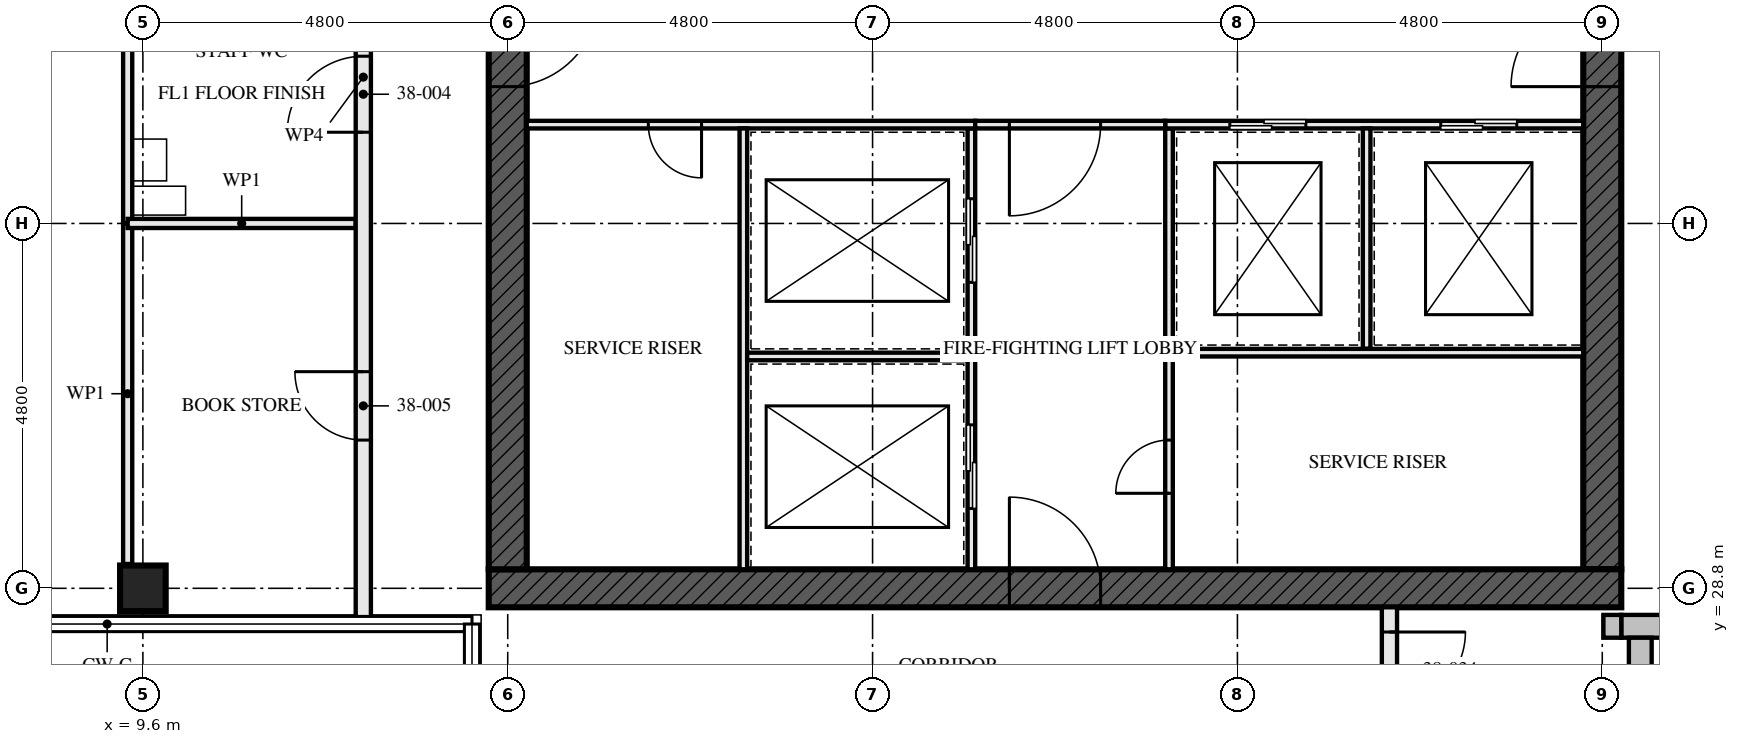
"""IFC4 building model, lengths in metres.
Left out: names, types, materials, properties, quantities, classifications, styles, units other than length and angle.
Written with IfcOpenShell. Run it as: python <this file> out.ifc"""

import sys

from ifc_helpers import new_model, si_unit, direction, frame, frame_2d, origin, origin_2d, place, context, subcontext, project, spatial, rectangle, hollow_rectangle, extrude, element, fill, save


model = new_model("IFC4")
c1 = context("Model", 3, precision=1e-05, world=origin(), true_north=direction((0.0, 1.0)))
c2 = subcontext(c1, "Body", "Model", "MODEL_VIEW")
j1 = project(units=[si_unit("LENGTHUNIT", "METRE"), si_unit("PLANEANGLEUNIT", "RADIAN")], contexts=[c1])
p1 = place(None, origin())
s1 = spatial("IfcSite", under=j1, at=p1, CompositionType="ELEMENT")
p2 = place(p1, origin())
s2 = spatial("IfcBuilding", under=s1, at=p2, CompositionType="ELEMENT")
p3 = place(p2, frame((0.0, 0.0, 141.0)))
s3 = spatial("IfcBuildingStorey", under=s2, at=p3, CompositionType="ELEMENT", Elevation=141.0)
p4 = place(p3, frame((9.6, 28.8, 0.0), z_axis=(0.0, 0.0, 1.0), x_axis=(0.0, 1.0, 0.0)))
e1 = element("IfcColumn", 1, at=p4, inside=s3, PredefinedType="COLUMN", context=c2, shape_type="SweptSolid", body=[
    extrude(hollow_rectangle(XDim=0.6, YDim=0.6, WallThickness=0.08, at=origin_2d()), origin(), (0.0, 0.0, 1.0), 3.5),
])
p5 = place(p3, frame((14.15, 28.8, -0.17), z_axis=(0.0, 0.0, 1.0), x_axis=(1.0, 0.0, 0.0)))
e2 = element("IfcWall", 2, at=p5, inside=s3, PredefinedType="SHEAR", context=c2, shape_type="SweptSolid", body=[
    extrude(rectangle(XDim=14.9, YDim=0.5, at=frame_2d((7.45, 0.0))), origin(), (0.0, 0.0, 1.0), 3.5),
])
p6 = place(p5, frame((6.85, 0.0, 0.17)))
e3 = element("IfcOpeningElement", 3, at=p6, cuts=e2, PredefinedType="OPENING", context=c2, shape_type="SweptSolid", body=[
    extrude(rectangle(XDim=1.2, YDim=2.1, at=frame_2d((0.6, 1.05))), frame((0.0, 0.26, 0.0), z_axis=(0.0, -1.0, 0.0), x_axis=(1.0, 0.0, 0.0)), (0.0, 0.0, 1.0), 0.521),
])
p7 = place(p3, frame((14.4, 42.95, -0.17), z_axis=(0.0, 0.0, 1.0), x_axis=(0.0, -1.0, 0.0)))
e4 = element("IfcWall", 4, at=p7, inside=s3, PredefinedType="SHEAR", context=c2, shape_type="SweptSolid", body=[
    extrude(rectangle(XDim=13.9, YDim=0.5, at=frame_2d((6.95, 0.0))), origin(), (0.0, 0.0, 1.0), 3.5),
])
p8 = place(p7, frame((6.35, 0.0, 0.17)))
e5 = element("IfcOpeningElement", 5, at=p8, cuts=e4, PredefinedType="OPENING", context=c2, shape_type="SweptSolid", body=[
    extrude(rectangle(XDim=1.2, YDim=2.1, at=frame_2d((0.6, 1.05))), frame((0.0, 0.26, 0.0), z_axis=(0.0, -1.0, 0.0), x_axis=(1.0, 0.0, 0.0)), (0.0, 0.0, 1.0), 0.521),
])
p9 = place(p3, frame((28.8, 29.05, -0.17), z_axis=(0.0, 0.0, 1.0), x_axis=(0.0, 1.0, 0.0)))
e6 = element("IfcWall", 6, at=p9, inside=s3, PredefinedType="SHEAR", context=c2, shape_type="SweptSolid", body=[
    extrude(rectangle(XDim=13.9, YDim=0.5, at=frame_2d((6.95, 0.0))), origin(), (0.0, 0.0, 1.0), 3.5),
])
p10 = place(p9, frame((6.35, 0.0, 0.17)))
e7 = element("IfcOpeningElement", 7, at=p10, cuts=e6, PredefinedType="OPENING", context=c2, shape_type="SweptSolid", body=[
    extrude(rectangle(XDim=1.2, YDim=2.1, at=frame_2d((0.6, 1.05))), frame((0.0, 0.26, 0.0), z_axis=(0.0, -1.0, 0.0), x_axis=(1.0, 0.0, 0.0)), (0.0, 0.0, 1.0), 0.521),
])
p11 = place(p3, frame((29.05, 28.3, 0.0), z_axis=(0.0, 0.0, 1.0), x_axis=(1.0, 0.0, 0.0)))
e8 = element("IfcWall", 8, at=p11, inside=s3, PredefinedType="SOLIDWALL", context=c2, shape_type="SweptSolid", body=[
    extrude(rectangle(XDim=10.0, YDim=0.3, at=frame_2d((5.0, 0.0))), origin(), (0.0, 0.0, 1.0), 3.5),
])
p12 = place(p11, frame((0.95, 0.0, 0.6)))
e9 = element("IfcOpeningElement", 9, at=p12, cuts=e8, PredefinedType="OPENING", context=c2, shape_type="SweptSolid", body=[
    extrude(rectangle(XDim=2.4, YDim=1.8, at=frame_2d((1.2, 0.9))), frame((0.0, 0.161, 0.0), z_axis=(0.0, -1.0, 0.0), x_axis=(1.0, 0.0, 0.0)), (0.0, 0.0, 1.0), 0.321),
])
p13 = place(p11, frame((5.75, 0.0, 0.6)))
e10 = element("IfcOpeningElement", 10, at=p13, cuts=e8, PredefinedType="OPENING", context=c2, shape_type="SweptSolid", body=[
    extrude(rectangle(XDim=2.4, YDim=1.8, at=frame_2d((1.2, 0.9))), frame((0.0, 0.161, 0.0), z_axis=(0.0, -1.0, 0.0), x_axis=(1.0, 0.0, 0.0)), (0.0, 0.0, 1.0), 0.321),
])
p14 = place(p3, frame((29.3, 18.85, 0.0), z_axis=(0.0, 0.0, 1.0), x_axis=(0.0, 1.0, 0.0)))
e11 = element("IfcWall", 11, at=p14, inside=s3, PredefinedType="SOLIDWALL", context=c2, shape_type="SweptSolid", body=[
    extrude(rectangle(XDim=9.3, YDim=0.3, at=frame_2d((4.65, 0.0))), origin(), (0.0, 0.0, 1.0), 3.5),
])
p15 = place(p14, frame((2.25, 0.0, 0.0)))
e12 = element("IfcOpeningElement", 12, at=p15, cuts=e11, PredefinedType="OPENING", context=c2, shape_type="SweptSolid", body=[
    extrude(rectangle(XDim=1.0, YDim=2.4, at=frame_2d((0.5, 1.2))), frame((0.0, 0.161, 0.0), z_axis=(0.0, -1.0, 0.0), x_axis=(1.0, 0.0, 0.0)), (0.0, 0.0, 1.0), 0.321),
])
p16 = place(p14, frame((6.35, 0.0, 0.6)))
e13 = element("IfcOpeningElement", 13, at=p16, cuts=e11, PredefinedType="OPENING", context=c2, shape_type="SweptSolid", body=[
    extrude(rectangle(XDim=2.4, YDim=1.8, at=frame_2d((1.2, 0.9))), frame((0.0, 0.161, 0.0), z_axis=(0.0, -1.0, 0.0), x_axis=(1.0, 0.0, 0.0)), (0.0, 0.0, 1.0), 0.321),
])
p17 = place(p3, frame((28.815, 28.3, 2.39), z_axis=(0.0, 0.0, 1.0), x_axis=(1.0, 0.0, 0.0)))
e14 = element("IfcWall", 14, at=p17, inside=s3, PredefinedType="SOLIDWALL", context=c2, shape_type="SweptSolid", body=[
    extrude(rectangle(XDim=0.235, YDim=0.3, at=frame_2d((0.118, 0.0))), origin(), (0.0, 0.0, 1.0), 0.88),
])
p18 = place(p3, frame((9.4, 37.0, 0.0), z_axis=(0.0, 0.0, 1.0), x_axis=(0.0, -1.0, 0.0)))
e15 = element("IfcWall", 15, at=p18, inside=s3, PredefinedType="PARTITIONING", context=c2, shape_type="SweptSolid", body=[
    extrude(rectangle(XDim=3.4, YDim=0.12, at=frame_2d((1.7, 0.0))), origin(), (0.0, 0.0, 1.0), 3.33),
])
p19 = place(p3, frame((9.4, 33.6, 0.0), z_axis=(0.0, 0.0, 1.0), x_axis=(1.0, 0.0, 0.0)))
e16 = element("IfcWall", 16, at=p19, inside=s3, PredefinedType="PARTITIONING", context=c2, shape_type="SweptSolid", body=[
    extrude(rectangle(XDim=3.0, YDim=0.12, at=frame_2d((1.5, 0.0))), origin(), (0.0, 0.0, 1.0), 2.55),
])
p20 = place(p3, frame((9.4, 33.6, 0.0), z_axis=(0.0, 0.0, 1.0), x_axis=(0.0, -1.0, 0.0)))
e17 = element("IfcWall", 17, at=p20, inside=s3, PredefinedType="PARTITIONING", context=c2, shape_type="SweptSolid", body=[
    extrude(rectangle(XDim=4.48, YDim=0.12, at=frame_2d((2.24, 0.0))), origin(), (0.0, 0.0, 1.0), 3.33),
])
p21 = place(p3, frame((12.5, 42.7, 0.0), z_axis=(0.0, 0.0, 1.0), x_axis=(0.0, -1.0, 0.0)))
e18 = element("IfcWall", 18, at=p21, inside=s3, PredefinedType="PARTITIONING", context=c2, shape_type="SweptSolid", body=[
    extrude(rectangle(XDim=14.35, YDim=0.2, at=frame_2d((7.175, 0.0))), origin(), (0.0, 0.0, 1.0), 2.32),
])
p22 = place(p21, frame((0.9, 0.0, 0.0)))
e19 = element("IfcOpeningElement", 19, at=p22, cuts=e18, PredefinedType="OPENING", context=c2, shape_type="SweptSolid", body=[
    extrude(rectangle(XDim=1.0, YDim=2.1, at=frame_2d((0.5, 1.05))), frame((0.0, 0.111, 0.0), z_axis=(0.0, -1.0, 0.0), x_axis=(1.0, 0.0, 0.0)), (0.0, 0.0, 1.0), 0.221),
])
p23 = place(p21, frame((3.1, 0.0, 0.0)))
e20 = element("IfcOpeningElement", 20, at=p23, cuts=e18, PredefinedType="OPENING", context=c2, shape_type="SweptSolid", body=[
    extrude(rectangle(XDim=1.0, YDim=2.0, at=frame_2d((0.5, 1.0))), frame((0.0, 0.111, 0.0), z_axis=(0.0, -1.0, 0.0), x_axis=(1.0, 0.0, 0.0)), (0.0, 0.0, 1.0), 0.221),
])
p24 = place(p21, frame((4.5, 0.0, 0.0)))
e21 = element("IfcOpeningElement", 21, at=p24, cuts=e18, PredefinedType="OPENING", context=c2, shape_type="SweptSolid", body=[
    extrude(rectangle(XDim=1.0, YDim=2.0, at=frame_2d((0.5, 1.0))), frame((0.0, 0.111, 0.0), z_axis=(0.0, -1.0, 0.0), x_axis=(1.0, 0.0, 0.0)), (0.0, 0.0, 1.0), 0.221),
])
p25 = place(p21, frame((6.9, 0.0, 0.0)))
e22 = element("IfcOpeningElement", 22, at=p25, cuts=e18, PredefinedType="OPENING", context=c2, shape_type="SweptSolid", body=[
    extrude(rectangle(XDim=1.0, YDim=2.1, at=frame_2d((0.5, 1.05))), frame((0.0, 0.111, 0.0), z_axis=(0.0, -1.0, 0.0), x_axis=(1.0, 0.0, 0.0)), (0.0, 0.0, 1.0), 0.221),
])
p26 = place(p21, frame((11.05, 0.0, 0.0)))
e23 = element("IfcOpeningElement", 23, at=p26, cuts=e18, PredefinedType="OPENING", context=c2, shape_type="SweptSolid", body=[
    extrude(rectangle(XDim=0.9, YDim=2.1, at=frame_2d((0.45, 1.05))), frame((0.0, 0.111, 0.0), z_axis=(0.0, -1.0, 0.0), x_axis=(1.0, 0.0, 0.0)), (0.0, 0.0, 1.0), 0.221),
])
p27 = place(p3, frame((20.5, 29.05, 0.0), z_axis=(0.0, 0.0, 1.0), x_axis=(0.0, 1.0, 0.0)))
e24 = element("IfcWall", 24, at=p27, inside=s3, PredefinedType="SOLIDWALL", context=c2, shape_type="SweptSolid", body=[
    extrude(rectangle(XDim=5.8, YDim=0.1, at=frame_2d((2.9, 0.0))), origin(), (0.0, 0.0, 1.0), 3.33),
])
p28 = place(p27, frame((0.8, 0.0, 0.0)))
e25 = element("IfcOpeningElement", 25, at=p28, cuts=e24, PredefinedType="OPENING", context=c2, shape_type="SweptSolid", body=[
    extrude(rectangle(XDim=1.1, YDim=2.3, at=frame_2d((0.55, 1.15))), frame((0.0, 0.061, 0.0), z_axis=(0.0, -1.0, 0.0), x_axis=(1.0, 0.0, 0.0)), (0.0, 0.0, 1.0), 0.121),
])
p29 = place(p27, frame((3.775, 0.0, 0.0)))
e26 = element("IfcOpeningElement", 26, at=p29, cuts=e24, PredefinedType="OPENING", context=c2, shape_type="SweptSolid", body=[
    extrude(rectangle(XDim=1.1, YDim=2.3, at=frame_2d((0.55, 1.15))), frame((0.0, 0.061, 0.0), z_axis=(0.0, -1.0, 0.0), x_axis=(1.0, 0.0, 0.0)), (0.0, 0.0, 1.0), 0.121),
])
p30 = place(p3, frame((23.1, 29.05, 0.0), z_axis=(0.0, 0.0, 1.0), x_axis=(0.0, 1.0, 0.0)))
e27 = element("IfcWall", 27, at=p30, inside=s3, PredefinedType="SOLIDWALL", context=c2, shape_type="SweptSolid", body=[
    extrude(rectangle(XDim=5.8, YDim=0.1, at=frame_2d((2.9, 0.0))), origin(), (0.0, 0.0, 1.0), 3.33),
])
p31 = place(p30, frame((1.0, 0.0, 0.0)))
e28 = element("IfcOpeningElement", 28, at=p31, cuts=e27, PredefinedType="OPENING", context=c2, shape_type="SweptSolid", body=[
    extrude(rectangle(XDim=0.7, YDim=2.1, at=frame_2d((0.35, 1.05))), frame((0.0, 0.061, 0.0), z_axis=(0.0, -1.0, 0.0), x_axis=(1.0, 0.0, 0.0)), (0.0, 0.0, 1.0), 0.121),
])
p32 = place(p3, frame((14.65, 34.9, 0.0), z_axis=(0.0, 0.0, 1.0), x_axis=(1.0, 0.0, 0.0)))
e29 = element("IfcWall", 29, at=p32, inside=s3, PredefinedType="SOLIDWALL", context=c2, shape_type="SweptSolid", body=[
    extrude(rectangle(XDim=5.9, YDim=0.1, at=frame_2d((2.95, 0.0))), origin(), (0.0, 0.0, 1.0), 3.33),
])
p33 = place(p32, frame((1.6, 0.0, 0.0)))
e30 = element("IfcOpeningElement", 30, at=p33, cuts=e29, PredefinedType="OPENING", context=c2, shape_type="SweptSolid", body=[
    extrude(rectangle(XDim=0.7, YDim=2.1, at=frame_2d((0.35, 1.05))), frame((0.0, 0.061, 0.0), z_axis=(0.0, -1.0, 0.0), x_axis=(1.0, 0.0, 0.0)), (0.0, 0.0, 1.0), 0.121),
])
p34 = place(p3, frame((23.05, 34.9, 0.0), z_axis=(0.0, 0.0, 1.0), x_axis=(1.0, 0.0, 0.0)))
e31 = element("IfcWall", 31, at=p34, inside=s3, PredefinedType="SOLIDWALL", context=c2, shape_type="SweptSolid", body=[
    extrude(rectangle(XDim=5.5, YDim=0.1, at=frame_2d((2.75, 0.0))), origin(), (0.0, 0.0, 1.0), 3.33),
])
p35 = place(p34, frame((0.85, 0.0, 0.0)))
e32 = element("IfcOpeningElement", 32, at=p35, cuts=e31, PredefinedType="OPENING", context=c2, shape_type="SweptSolid", body=[
    extrude(rectangle(XDim=1.0, YDim=2.1, at=frame_2d((0.5, 1.05))), frame((0.0, 0.061, 0.0), z_axis=(0.0, -1.0, 0.0), x_axis=(1.0, 0.0, 0.0)), (0.0, 0.0, 1.0), 0.121),
])
p36 = place(p34, frame((3.625, 0.0, 0.0)))
e33 = element("IfcOpeningElement", 33, at=p36, cuts=e31, PredefinedType="OPENING", context=c2, shape_type="SweptSolid", body=[
    extrude(rectangle(XDim=1.0, YDim=2.1, at=frame_2d((0.5, 1.05))), frame((0.0, 0.061, 0.0), z_axis=(0.0, -1.0, 0.0), x_axis=(1.0, 0.0, 0.0)), (0.0, 0.0, 1.0), 0.121),
])
p37 = place(p3, frame((20.55, 34.9, 0.0), z_axis=(0.0, 0.0, 1.0), x_axis=(1.0, 0.0, 0.0)))
e34 = element("IfcWall", 34, at=p37, inside=s3, PredefinedType="SOLIDWALL", context=c2, shape_type="SweptSolid", body=[
    extrude(rectangle(XDim=2.5, YDim=0.1, at=frame_2d((1.25, 0.0))), origin(), (0.0, 0.0, 1.0), 3.33),
])
p38 = place(p37, frame((0.45, 0.0, 0.0)))
e35 = element("IfcOpeningElement", 35, at=p38, cuts=e34, PredefinedType="OPENING", context=c2, shape_type="SweptSolid", body=[
    extrude(rectangle(XDim=1.2, YDim=2.1, at=frame_2d((0.6, 1.05))), frame((0.0, 0.061, 0.0), z_axis=(0.0, -1.0, 0.0), x_axis=(1.0, 0.0, 0.0)), (0.0, 0.0, 1.0), 0.121),
])
p39 = place(p3, frame((17.5, 29.05, 0.0), z_axis=(0.0, 0.0, 1.0), x_axis=(0.0, 1.0, 0.0)))
e36 = element("IfcWall", 36, at=p39, inside=s3, PredefinedType="SOLIDWALL", context=c2, shape_type="SweptSolid", body=[
    extrude(rectangle(XDim=5.8, YDim=0.1, at=frame_2d((2.9, 0.0))), origin(), (0.0, 0.0, 1.0), 3.33),
])
p40 = place(p3, frame((17.55, 31.85, 0.0), z_axis=(0.0, 0.0, 1.0), x_axis=(1.0, 0.0, 0.0)))
e37 = element("IfcWall", 37, at=p40, inside=s3, PredefinedType="SOLIDWALL", context=c2, shape_type="SweptSolid", body=[
    extrude(rectangle(XDim=2.9, YDim=0.1, at=frame_2d((1.45, 0.0))), origin(), (0.0, 0.0, 1.0), 3.33),
])
p41 = place(p3, frame((25.7, 31.95, 0.0), z_axis=(0.0, 0.0, 1.0), x_axis=(0.0, 1.0, 0.0)))
e38 = element("IfcWall", 38, at=p41, inside=s3, PredefinedType="SOLIDWALL", context=c2, shape_type="SweptSolid", body=[
    extrude(rectangle(XDim=2.9, YDim=0.1, at=frame_2d((1.45, 0.0))), origin(), (0.0, 0.0, 1.0), 3.33),
])
p42 = place(p3, frame((23.15, 31.9, 0.0), z_axis=(0.0, 0.0, 1.0), x_axis=(1.0, 0.0, 0.0)))
e39 = element("IfcWall", 39, at=p42, inside=s3, PredefinedType="SOLIDWALL", context=c2, shape_type="SweptSolid", body=[
    extrude(rectangle(XDim=5.4, YDim=0.1, at=frame_2d((2.7, 0.0))), origin(), (0.0, 0.0, 1.0), 3.33),
])
p43 = place(p3, frame((26.0, 26.9, 0.0), z_axis=(0.0, 0.0, 1.0), x_axis=(0.0, 1.0, 0.0)))
e40 = element("IfcWall", 40, at=p43, inside=s3, PredefinedType="PARTITIONING", context=c2, shape_type="SweptSolid", body=[
    extrude(rectangle(XDim=1.65, YDim=0.2, at=frame_2d((0.825, 0.0))), origin(), (0.0, 0.0, 1.0), 3.33),
])
p44 = place(p43, frame((0.325, 0.0, 0.0)))
e41 = element("IfcOpeningElement", 41, at=p44, cuts=e40, PredefinedType="OPENING", context=c2, shape_type="SweptSolid", body=[
    extrude(rectangle(XDim=1.0, YDim=2.1, at=frame_2d((0.5, 1.05))), frame((0.0, 0.111, 0.0), z_axis=(0.0, -1.0, 0.0), x_axis=(1.0, 0.0, 0.0)), (0.0, 0.0, 1.0), 0.221),
])
p45 = place(p25, frame((1.0, 0.0, 0.0), z_axis=(0.0, 0.0, 1.0), x_axis=(-1.0, 0.0, 0.0)))
e42 = element("IfcDoor", 42, at=p45, inside=s3, OperationType="SINGLE_SWING_RIGHT", PredefinedType="DOOR", context=c2, shape_type="SweptSolid", body=[
    extrude(rectangle(XDim=1.0, YDim=2.1, at=frame_2d((0.5, 1.05))), frame((0.0, 0.027, 0.0), z_axis=(0.0, -1.0, 0.0), x_axis=(1.0, 0.0, 0.0)), (0.0, 0.0, 1.0), 0.054),
])
fill(e22, e42)
p46 = place(p26, frame((0.9, 0.0, 0.0), z_axis=(0.0, 0.0, 1.0), x_axis=(-1.0, 0.0, 0.0)))
e43 = element("IfcDoor", 43, at=p46, inside=s3, OperationType="SINGLE_SWING_LEFT", PredefinedType="DOOR", context=c2, shape_type="SweptSolid", body=[
    extrude(rectangle(XDim=0.9, YDim=2.1, at=frame_2d((0.45, 1.05))), frame((0.0, 0.027, 0.0), z_axis=(0.0, -1.0, 0.0), x_axis=(1.0, 0.0, 0.0)), (0.0, 0.0, 1.0), 0.054),
])
fill(e23, e43)
p47 = place(p28, origin())
e44 = element("IfcDoor", 44, at=p47, inside=s3, OperationType="SLIDING_TO_LEFT", PredefinedType="DOOR", context=c2, shape_type="SweptSolid", body=[
    extrude(rectangle(XDim=1.1, YDim=2.3, at=frame_2d((0.55, 1.15))), frame((0.0, 0.05, 0.0), z_axis=(0.0, -1.0, 0.0), x_axis=(1.0, 0.0, 0.0)), (0.0, 0.0, 1.0), 0.1),
])
fill(e25, e44)
p48 = place(p29, origin())
e45 = element("IfcDoor", 45, at=p48, inside=s3, OperationType="SLIDING_TO_LEFT", PredefinedType="DOOR", context=c2, shape_type="SweptSolid", body=[
    extrude(rectangle(XDim=1.1, YDim=2.3, at=frame_2d((0.55, 1.15))), frame((0.0, 0.05, 0.0), z_axis=(0.0, -1.0, 0.0), x_axis=(1.0, 0.0, 0.0)), (0.0, 0.0, 1.0), 0.1),
])
fill(e26, e45)
p49 = place(p31, origin())
e46 = element("IfcDoor", 46, at=p49, inside=s3, OperationType="SINGLE_SWING_RIGHT", PredefinedType="DOOR", context=c2, shape_type="SweptSolid", body=[
    extrude(rectangle(XDim=0.7, YDim=2.1, at=frame_2d((0.35, 1.05))), frame((0.0, 0.027, 0.0), z_axis=(0.0, -1.0, 0.0), x_axis=(1.0, 0.0, 0.0)), (0.0, 0.0, 1.0), 0.054),
])
fill(e28, e46)
p50 = place(p33, frame((0.7, 0.0, 0.0), z_axis=(0.0, 0.0, 1.0), x_axis=(-1.0, 0.0, 0.0)))
e47 = element("IfcDoor", 47, at=p50, inside=s3, OperationType="SINGLE_SWING_RIGHT", PredefinedType="DOOR", context=c2, shape_type="SweptSolid", body=[
    extrude(rectangle(XDim=0.7, YDim=2.1, at=frame_2d((0.35, 1.05))), frame((0.0, 0.027, 0.0), z_axis=(0.0, -1.0, 0.0), x_axis=(1.0, 0.0, 0.0)), (0.0, 0.0, 1.0), 0.054),
])
fill(e30, e47)
p51 = place(p35, origin())
e48 = element("IfcDoor", 48, at=p51, inside=s3, OperationType="SLIDING_TO_LEFT", PredefinedType="DOOR", context=c2, shape_type="SweptSolid", body=[
    extrude(rectangle(XDim=1.0, YDim=2.1, at=frame_2d((0.5, 1.05))), frame((0.0, 0.05, 0.0), z_axis=(0.0, -1.0, 0.0), x_axis=(1.0, 0.0, 0.0)), (0.0, 0.0, 1.0), 0.1),
])
fill(e32, e48)
p52 = place(p36, origin())
e49 = element("IfcDoor", 49, at=p52, inside=s3, OperationType="SLIDING_TO_LEFT", PredefinedType="DOOR", context=c2, shape_type="SweptSolid", body=[
    extrude(rectangle(XDim=1.0, YDim=2.1, at=frame_2d((0.5, 1.05))), frame((0.0, 0.05, 0.0), z_axis=(0.0, -1.0, 0.0), x_axis=(1.0, 0.0, 0.0)), (0.0, 0.0, 1.0), 0.1),
])
fill(e33, e49)
p53 = place(p38, frame((1.2, 0.0, 0.0), z_axis=(0.0, 0.0, 1.0), x_axis=(-1.0, 0.0, 0.0)))
e50 = element("IfcDoor", 50, at=p53, inside=s3, OperationType="SINGLE_SWING_LEFT", PredefinedType="DOOR", context=c2, shape_type="SweptSolid", body=[
    extrude(rectangle(XDim=1.2, YDim=2.1, at=frame_2d((0.6, 1.05))), frame((0.0, 0.027, 0.0), z_axis=(0.0, -1.0, 0.0), x_axis=(1.0, 0.0, 0.0)), (0.0, 0.0, 1.0), 0.054),
])
fill(e35, e50)
p54 = place(p44, frame((1.0, 0.0, 0.0), z_axis=(0.0, 0.0, 1.0), x_axis=(-1.0, 0.0, 0.0)))
e51 = element("IfcDoor", 51, at=p54, inside=s3, OperationType="SINGLE_SWING_RIGHT", PredefinedType="DOOR", context=c2, shape_type="SweptSolid", body=[
    extrude(rectangle(XDim=1.0, YDim=2.1, at=frame_2d((0.5, 1.05))), frame((0.0, 0.027, 0.0), z_axis=(0.0, -1.0, 0.0), x_axis=(1.0, 0.0, 0.0)), (0.0, 0.0, 1.0), 0.054),
])
fill(e41, e51)
p55 = place(p6, origin())
e52 = element("IfcDoor", 52, at=p55, inside=s3, OperationType="SINGLE_SWING_LEFT", PredefinedType="DOOR", context=c2, shape_type="SweptSolid", body=[
    extrude(rectangle(XDim=1.2, YDim=2.1, at=frame_2d((0.6, 1.05))), frame((0.0, 0.027, 0.0), z_axis=(0.0, -1.0, 0.0), x_axis=(1.0, 0.0, 0.0)), (0.0, 0.0, 1.0), 0.054),
])
fill(e3, e52)
p56 = place(p8, origin())
e53 = element("IfcDoor", 53, at=p56, inside=s3, OperationType="SINGLE_SWING_LEFT", PredefinedType="DOOR", context=c2, shape_type="SweptSolid", body=[
    extrude(rectangle(XDim=1.2, YDim=2.1, at=frame_2d((0.6, 1.05))), frame((0.0, 0.027, 0.0), z_axis=(0.0, -1.0, 0.0), x_axis=(1.0, 0.0, 0.0)), (0.0, 0.0, 1.0), 0.054),
])
fill(e5, e53)
p57 = place(p10, origin())
e54 = element("IfcDoor", 54, at=p57, inside=s3, OperationType="SINGLE_SWING_LEFT", PredefinedType="DOOR", context=c2, shape_type="SweptSolid", body=[
    extrude(rectangle(XDim=1.2, YDim=2.1, at=frame_2d((0.6, 1.05))), frame((0.0, 0.027, 0.0), z_axis=(0.0, -1.0, 0.0), x_axis=(1.0, 0.0, 0.0)), (0.0, 0.0, 1.0), 0.054),
])
fill(e7, e54)
save(model, sys.argv[1])
